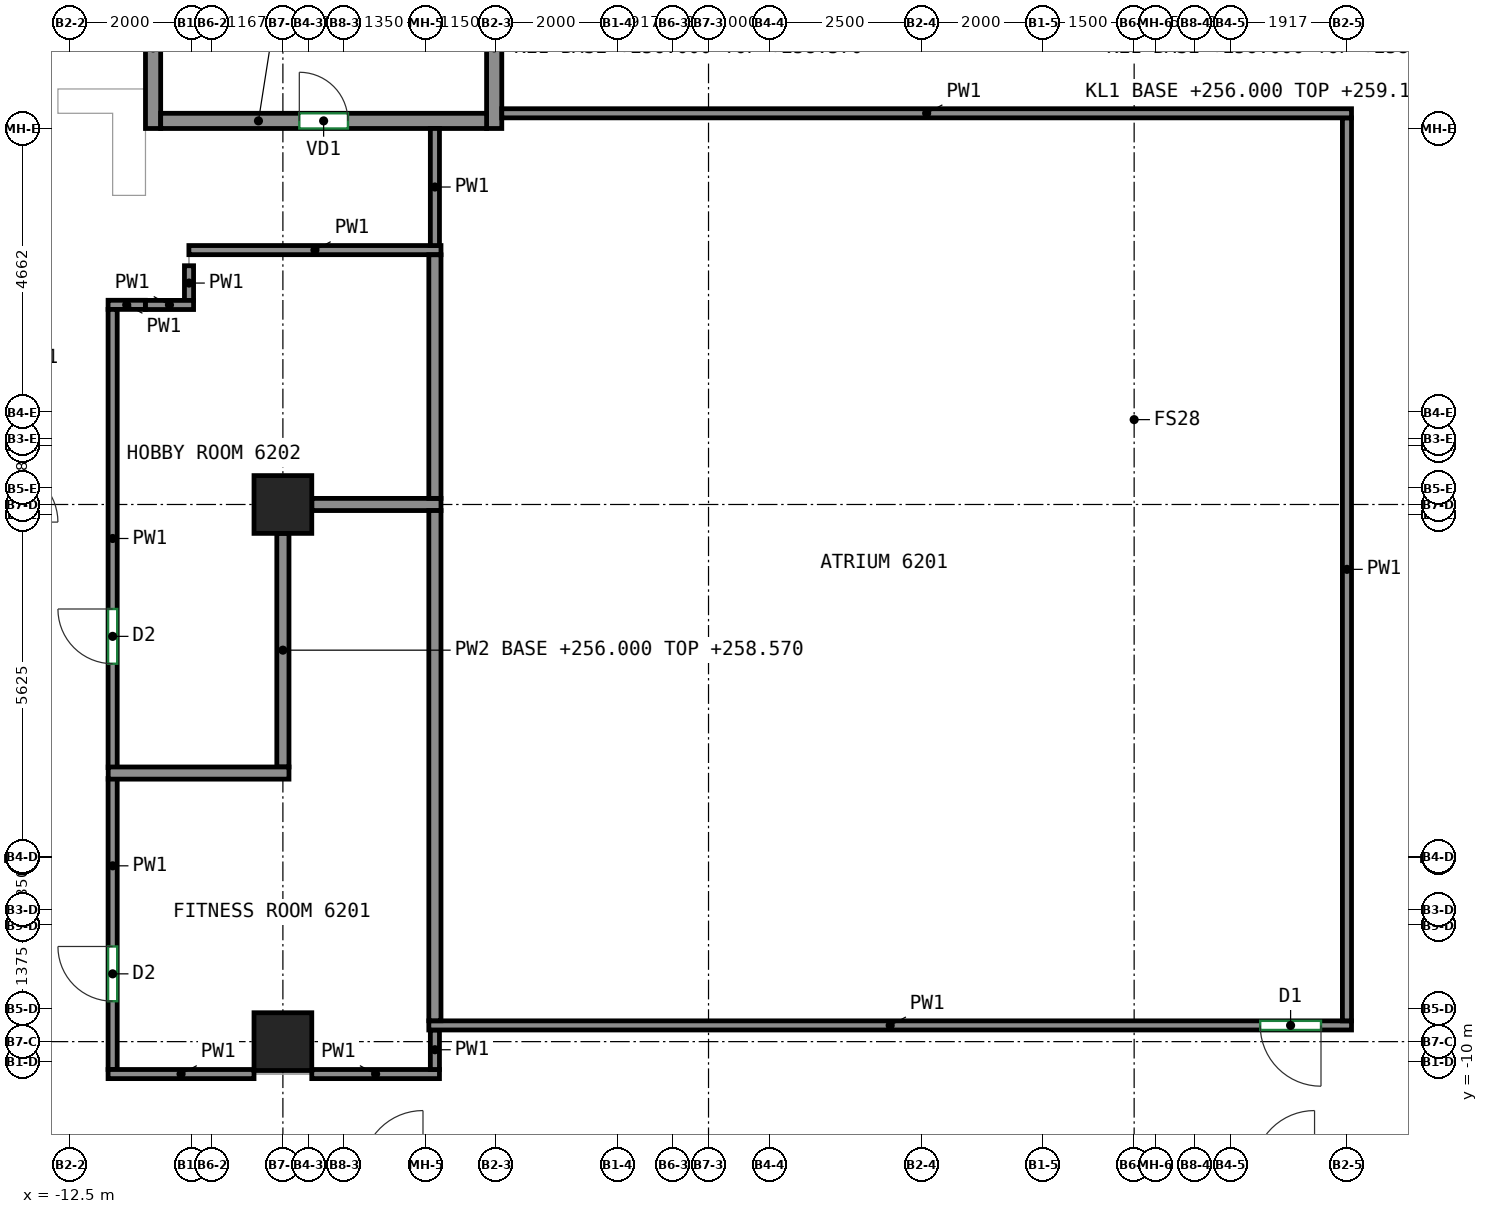
"""IFC4 building model, lengths in metres.
Left out: names, types, materials, properties, quantities, classifications, styles, units other than length and angle.
Written with IfcOpenShell. Run it as: python <this file> out.ifc"""

import sys

from ifc_helpers import new_model, si_unit, direction, frame, frame_2d, origin, origin_2d, place, context, subcontext, project, spatial, rectangle, extrude, source, transform, mapped, element, fill, save


model = new_model("IFC4")
c1 = context("Model", 3, precision=1e-05, world=origin(), true_north=direction((0.0, 1.0)))
c2 = subcontext(c1, "Body", "Model", "MODEL_VIEW")
j1 = project(units=[si_unit("LENGTHUNIT", "METRE"), si_unit("PLANEANGLEUNIT", "RADIAN")], contexts=[c1])
p1 = place(None, origin())
s1 = spatial("IfcSite", under=j1, at=p1, CompositionType="ELEMENT")
p2 = place(p1, origin())
s2 = spatial("IfcBuilding", under=s1, at=p2, CompositionType="ELEMENT")
p3 = place(p2, frame((0.0, 0.0, 256.0)))
s3 = spatial("IfcBuildingStorey", under=s2, at=p3, CompositionType="ELEMENT", Elevation=256.0)
m1 = source(origin(), c2, "Body", "SweptSolid", [
    extrude(rectangle(XDim=0.95, YDim=0.95, at=origin_2d()), origin(), (0.0, 0.0, 1.0), 3.12),
])
for number, where, z_axis, x_axis in (
    (1, (-9.0, -9.667, 0.0), (0.0, 0.0, 1.0), (1.0, 0.0, 0.0)),
    (2, (-9.0, -0.833, 0.0), (0.0, 0.0, 1.0), (1.0, 0.0, 0.0)),
):
    element("IfcColumn", number, at=place(p3, frame(where, z_axis=z_axis, x_axis=x_axis)), inside=s3, PredefinedType="COLUMN", context=c2, shape_type="MappedRepresentation", body=[
        mapped(m1, transform((0.0, 0.0, 0.0))),
    ])
m2 = source(origin(), c2, "Body", "SweptSolid", [
    extrude(rectangle(XDim=2.65, YDim=0.25, at=frame_2d((1.325, 0.0))), origin(), (0.0, 0.0, 1.0), 2.57),
])
for number, where, z_axis, x_axis in (
    (3, (-11.135, 5.35, 0.0), (0.0, 0.0, 1.0), (0.0, 1.0, 0.0)),
    (4, (-5.525, 5.35, 0.0), (0.0, 0.0, 1.0), (0.0, 1.0, 0.0)),
):
    element("IfcWall", number, at=place(p3, frame(where, z_axis=z_axis, x_axis=x_axis)), inside=s3, PredefinedType="PARTITIONING", context=c2, shape_type="MappedRepresentation", body=[
        mapped(m2, transform((0.0, 0.0, 0.0))),
    ])
m3 = source(origin(), c2, "Body", "SweptSolid", [
    extrude(rectangle(XDim=5.36, YDim=0.25, at=frame_2d((2.68, 0.0))), origin(), (0.0, 0.0, 1.0), 3.12),
])
p4 = place(p3, frame((-11.01, 5.475, 0.0), z_axis=(0.0, 0.0, 1.0), x_axis=(1.0, 0.0, 0.0)))
e5 = element("IfcWall", 5, at=p4, inside=s3, PredefinedType="PARTITIONING", context=c2, shape_type="MappedRepresentation", body=[
    mapped(m3, transform((0.0, 0.0, 0.0))),
])
p5 = place(p4, frame((2.28, 0.0, 0.0)))
e6 = element("IfcOpeningElement", 6, at=p5, cuts=e5, PredefinedType="OPENING", context=c2, shape_type="SweptSolid", body=[
    extrude(rectangle(XDim=0.8, YDim=2.0, at=frame_2d((0.4, 1.0))), frame((0.0, 0.135, 0.0), z_axis=(0.0, -1.0, 0.0), x_axis=(1.0, 0.0, 0.0)), (0.0, 0.0, 1.0), 0.27),
])
p6 = place(p3, frame((-10.546, 3.35, 0.0), z_axis=(0.0, 0.0, 1.0), x_axis=(1.0, 0.0, 0.0)))
e7 = element("IfcWall", 7, at=p6, inside=s3, PredefinedType="PARTITIONING", context=c2, shape_type="SweptSolid", body=[
    extrude(rectangle(XDim=4.146, YDim=0.15, at=frame_2d((2.073, 0.0))), origin(), (0.0, 0.0, 1.0), 3.12),
])
p7 = place(p3, frame((-10.544, 2.523, 0.0), z_axis=(0.0, 0.0, 1.0), x_axis=(0.0, 1.0, 0.0)))
e8 = element("IfcWall", 8, at=p7, inside=s3, PredefinedType="PARTITIONING", context=c2, shape_type="SweptSolid", body=[
    extrude(rectangle(XDim=0.57, YDim=0.15, at=frame_2d((0.285, 0.0))), origin(), (0.0, 0.0, 1.0), 3.12),
])
p8 = place(p3, frame((-11.262, 2.448, 0.0), z_axis=(0.0, 0.0, 1.0), x_axis=(1.0, 0.0, 0.0)))
e9 = element("IfcWall", 9, at=p8, inside=s3, PredefinedType="PARTITIONING", context=c2, shape_type="SweptSolid", body=[
    extrude(rectangle(XDim=0.793, YDim=0.15, at=frame_2d((0.396, 0.0))), origin(), (0.0, 0.0, 1.0), 3.12),
])
p9 = place(p3, frame((-11.875, 2.45, 0.0), z_axis=(0.0, 0.0, 1.0), x_axis=(1.0, 0.0, 0.0)))
e10 = element("IfcWall", 10, at=p9, inside=s3, PredefinedType="PARTITIONING", context=c2, shape_type="SweptSolid", body=[
    extrude(rectangle(XDim=0.613, YDim=0.15, at=frame_2d((0.307, 0.0))), origin(), (0.0, 0.0, 1.0), 3.12),
])
p10 = place(p3, frame((-11.8, -5.16, 0.0), z_axis=(0.0, 0.0, 1.0), x_axis=(0.0, 1.0, 0.0)))
e11 = element("IfcWall", 11, at=p10, inside=s3, PredefinedType="PARTITIONING", context=c2, shape_type="SweptSolid", body=[
    extrude(rectangle(XDim=7.535, YDim=0.15, at=frame_2d((3.768, 0.0))), origin(), (0.0, 0.0, 1.0), 3.12),
])
p11 = place(p10, frame((1.708, 0.0, 0.0)))
e12 = element("IfcOpeningElement", 12, at=p11, cuts=e11, PredefinedType="OPENING", context=c2, shape_type="SweptSolid", body=[
    extrude(rectangle(XDim=0.9, YDim=2.1, at=frame_2d((0.45, 1.05))), frame((0.0, 0.085, 0.0), z_axis=(0.0, -1.0, 0.0), x_axis=(1.0, 0.0, 0.0)), (0.0, 0.0, 1.0), 0.17),
])
p12 = place(p3, frame((-11.8, -10.125, 0.0), z_axis=(0.0, 0.0, 1.0), x_axis=(0.0, 1.0, 0.0)))
e13 = element("IfcWall", 13, at=p12, inside=s3, PredefinedType="PARTITIONING", context=c2, shape_type="SweptSolid", body=[
    extrude(rectangle(XDim=4.785, YDim=0.15, at=frame_2d((2.393, 0.0))), origin(), (0.0, 0.0, 1.0), 3.12),
])
p13 = place(p12, frame((1.123, 0.0, 0.0)))
e14 = element("IfcOpeningElement", 14, at=p13, cuts=e13, PredefinedType="OPENING", context=c2, shape_type="SweptSolid", body=[
    extrude(rectangle(XDim=0.9, YDim=2.1, at=frame_2d((0.45, 1.05))), frame((0.0, 0.085, 0.0), z_axis=(0.0, -1.0, 0.0), x_axis=(1.0, 0.0, 0.0)), (0.0, 0.0, 1.0), 0.17),
])
p14 = place(p3, frame((-8.525, -10.2, 0.0), z_axis=(0.0, 0.0, 1.0), x_axis=(1.0, 0.0, 0.0)))
e15 = element("IfcWall", 15, at=p14, inside=s3, PredefinedType="PARTITIONING", context=c2, shape_type="SweptSolid", body=[
    extrude(rectangle(XDim=2.1, YDim=0.15, at=frame_2d((1.05, 0.0))), origin(), (0.0, 0.0, 1.0), 3.12),
])
p15 = place(p3, frame((-11.875, -10.2, 0.0), z_axis=(0.0, 0.0, 1.0), x_axis=(1.0, 0.0, 0.0)))
e16 = element("IfcWall", 16, at=p15, inside=s3, PredefinedType="PARTITIONING", context=c2, shape_type="SweptSolid", body=[
    extrude(rectangle(XDim=2.4, YDim=0.15, at=frame_2d((1.2, 0.0))), origin(), (0.0, 0.0, 1.0), 3.12),
])
p16 = place(p3, frame((-6.5, -10.125, 0.0), z_axis=(0.0, 0.0, 1.0), x_axis=(0.0, 1.0, 0.0)))
e17 = element("IfcWall", 17, at=p16, inside=s3, PredefinedType="PARTITIONING", context=c2, shape_type="SweptSolid", body=[
    extrude(rectangle(XDim=0.65, YDim=0.15, at=frame_2d((0.325, 0.0))), origin(), (0.0, 0.0, 1.0), 3.12),
])
p17 = place(p3, frame((-6.5, 3.425, 0.0), z_axis=(0.0, 0.0, 1.0), x_axis=(0.0, 1.0, 0.0)))
e18 = element("IfcWall", 18, at=p17, inside=s3, PredefinedType="PARTITIONING", context=c2, shape_type="SweptSolid", body=[
    extrude(rectangle(XDim=1.925, YDim=0.15, at=frame_2d((0.962, 0.0))), origin(), (0.0, 0.0, 1.0), 3.12),
])
p18 = place(p3, frame((8.575, -9.4, 0.0), z_axis=(0.0, 0.0, 1.0), x_axis=(-1.0, 0.0, 0.0)))
e19 = element("IfcWall", 19, at=p18, inside=s3, PredefinedType="PARTITIONING", context=c2, shape_type="SweptSolid", body=[
    extrude(rectangle(XDim=15.175, YDim=0.15, at=frame_2d((7.587, 0.0))), origin(), (0.0, 0.0, 1.0), 3.12),
])
p19 = place(p18, frame((0.502, 0.0, 0.0)))
e20 = element("IfcOpeningElement", 20, at=p19, cuts=e19, PredefinedType="OPENING", context=c2, shape_type="SweptSolid", body=[
    extrude(rectangle(XDim=1.0, YDim=2.1, at=frame_2d((0.5, 1.05))), frame((0.0, 0.085, 0.0), z_axis=(0.0, -1.0, 0.0), x_axis=(1.0, 0.0, 0.0)), (0.0, 0.0, 1.0), 0.17),
])
p20 = place(p3, frame((8.5, 5.525, 0.0), z_axis=(0.0, 0.0, 1.0), x_axis=(0.0, -1.0, 0.0)))
e21 = element("IfcWall", 21, at=p20, inside=s3, PredefinedType="PARTITIONING", context=c2, shape_type="SweptSolid", body=[
    extrude(rectangle(XDim=14.85, YDim=0.15, at=frame_2d((7.425, 0.0))), origin(), (0.0, 0.0, 1.0), 3.12),
])
p21 = place(p3, frame((-5.4, 5.6, 0.0), z_axis=(0.0, 0.0, 1.0), x_axis=(1.0, 0.0, 0.0)))
e22 = element("IfcWall", 22, at=p21, inside=s3, PredefinedType="PARTITIONING", context=c2, shape_type="SweptSolid", body=[
    extrude(rectangle(XDim=13.975, YDim=0.15, at=frame_2d((6.987, 0.0))), origin(), (0.0, 0.0, 1.0), 3.12),
])
p22 = place(p3, frame((-8.525, -0.833, 0.0), z_axis=(0.0, 0.0, 1.0), x_axis=(1.0, 0.0, 0.0)))
e23 = element("IfcWall", 23, at=p22, inside=s3, PredefinedType="PARTITIONING", context=c2, shape_type="SweptSolid", body=[
    extrude(rectangle(XDim=2.125, YDim=0.2, at=frame_2d((1.062, 0.0))), origin(), (0.0, 0.0, 1.0), 3.12),
])
p23 = place(p3, frame((-9.0, -5.15, 0.0), z_axis=(0.0, 0.0, 1.0), x_axis=(0.0, 1.0, 0.0)))
e24 = element("IfcWall", 24, at=p23, inside=s3, PredefinedType="PARTITIONING", context=c2, shape_type="SweptSolid", body=[
    extrude(rectangle(XDim=3.842, YDim=0.2, at=frame_2d((1.921, 0.0))), origin(), (0.0, 0.0, 1.0), 2.57),
])
p24 = place(p3, frame((-11.873, -5.25, 0.0), z_axis=(0.0, 0.0, 1.0), x_axis=(1.0, 0.0, 0.0)))
e25 = element("IfcWall", 25, at=p24, inside=s3, PredefinedType="PARTITIONING", context=c2, shape_type="SweptSolid", body=[
    extrude(rectangle(XDim=2.973, YDim=0.2, at=frame_2d((1.487, 0.0))), origin(), (0.0, 0.0, 1.0), 3.12),
])
p25 = place(p3, frame((-6.5, -0.733, 0.0), z_axis=(0.0, 0.0, 1.0), x_axis=(0.0, 1.0, 0.0)))
e26 = element("IfcWall", 26, at=p25, inside=s3, PredefinedType="PARTITIONING", context=c2, shape_type="SweptSolid", body=[
    extrude(rectangle(XDim=4.006, YDim=0.2, at=frame_2d((2.003, 0.0))), origin(), (0.0, 0.0, 1.0), 3.12),
])
p26 = place(p3, frame((-6.5, -9.323, 0.0), z_axis=(0.0, 0.0, 1.0), x_axis=(0.0, 1.0, 0.0)))
e27 = element("IfcWall", 27, at=p26, inside=s3, PredefinedType="PARTITIONING", context=c2, shape_type="SweptSolid", body=[
    extrude(rectangle(XDim=8.39, YDim=0.2, at=frame_2d((4.195, 0.0))), origin(), (0.0, 0.0, 1.0), 3.12),
])
p27 = place(p5, origin())
e28 = element("IfcDoor", 28, at=p27, inside=s3, OperationType="SINGLE_SWING_LEFT", PredefinedType="DOOR", context=c2, shape_type="SweptSolid", body=[
    extrude(rectangle(XDim=0.8, YDim=2.0, at=frame_2d((0.4, 1.0))), frame((0.0, 0.025, 0.0), z_axis=(0.0, -1.0, 0.0), x_axis=(1.0, 0.0, 0.0)), (0.0, 0.0, 1.0), 0.05),
])
fill(e6, e28)
p28 = place(p19, origin())
e29 = element("IfcDoor", 29, at=p28, inside=s3, OperationType="SINGLE_SWING_LEFT", PredefinedType="DOOR", context=c2, shape_type="SweptSolid", body=[
    extrude(rectangle(XDim=1.0, YDim=2.1, at=frame_2d((0.5, 1.05))), frame((0.0, 0.025, 0.0), z_axis=(0.0, -1.0, 0.0), x_axis=(1.0, 0.0, 0.0)), (0.0, 0.0, 1.0), 0.05),
])
fill(e20, e29)
p29 = place(p13, origin())
e30 = element("IfcDoor", 30, at=p29, inside=s3, OperationType="SINGLE_SWING_RIGHT", PredefinedType="DOOR", context=c2, shape_type="SweptSolid", body=[
    extrude(rectangle(XDim=0.9, YDim=2.1, at=frame_2d((0.45, 1.05))), frame((0.0, 0.025, 0.0), z_axis=(0.0, -1.0, 0.0), x_axis=(1.0, 0.0, 0.0)), (0.0, 0.0, 1.0), 0.05),
])
fill(e14, e30)
p30 = place(p11, origin())
e31 = element("IfcDoor", 31, at=p30, inside=s3, OperationType="SINGLE_SWING_RIGHT", PredefinedType="DOOR", context=c2, shape_type="SweptSolid", body=[
    extrude(rectangle(XDim=0.9, YDim=2.1, at=frame_2d((0.45, 1.05))), frame((0.0, 0.025, 0.0), z_axis=(0.0, -1.0, 0.0), x_axis=(1.0, 0.0, 0.0)), (0.0, 0.0, 1.0), 0.05),
])
fill(e12, e31)
save(model, sys.argv[1])
